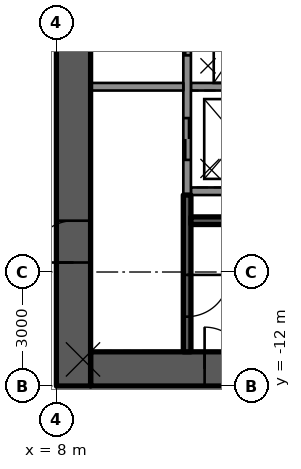
"""IFC4 building model, lengths in metres.
Left out: names, types, materials, properties, quantities, classifications, styles, units other than length and angle.
Written with IfcOpenShell. Run it as: python <this file> out.ifc"""

import sys

from ifc_helpers import new_model, si_unit, direction, frame, frame_2d, origin, place, context, subcontext, project, spatial, rectangle, extrude, element, fill, save


model = new_model("IFC4")
c1 = context("Model", 3, precision=1e-05, world=origin(), true_north=direction((0.0, 1.0)))
c2 = subcontext(c1, "Body", "Model", "MODEL_VIEW")
j1 = project(units=[si_unit("LENGTHUNIT", "METRE"), si_unit("PLANEANGLEUNIT", "RADIAN")], contexts=[c1])
p1 = place(None, origin())
s1 = spatial("IfcSite", under=j1, at=p1, CompositionType="ELEMENT")
p2 = place(p1, origin())
s2 = spatial("IfcBuilding", under=s1, at=p2, CompositionType="ELEMENT")
p3 = place(p2, frame((0.0, 0.0, 145.6)))
s3 = spatial("IfcBuildingStorey", under=s2, at=p3, CompositionType="ELEMENT", Elevation=145.6)
p4 = place(p3, frame((8.9, -11.55, 0.0), z_axis=(0.0, 0.0, 1.0), x_axis=(1.0, 0.0, 0.0)))
e1 = element("IfcWall", 1, at=p4, inside=s3, PredefinedType="SHEAR", context=c2, shape_type="SweptSolid", body=[
    extrude(rectangle(XDim=9.2, YDim=0.9, at=frame_2d((4.6, 0.0))), origin(), (0.0, 0.0, 1.0), 3.5),
])
p5 = place(p4, frame((3.0, 0.0, 0.0)))
e2 = element("IfcOpeningElement", 2, at=p5, cuts=e1, PredefinedType="OPENING", context=c2, shape_type="SweptSolid", body=[
    extrude(rectangle(XDim=1.1, YDim=2.1, at=frame_2d((0.55, 1.05))), frame((0.0, 0.46, 0.0), z_axis=(0.0, -1.0, 0.0), x_axis=(1.0, 0.0, 0.0)), (0.0, 0.0, 1.0), 0.92),
])
p6 = place(p3, frame((8.45, -12.0, 0.0), z_axis=(0.0, 0.0, 1.0), x_axis=(0.0, 1.0, 0.0)))
e3 = element("IfcWall", 3, at=p6, inside=s3, PredefinedType="SHEAR", context=c2, shape_type="SweptSolid", body=[
    extrude(rectangle(XDim=24.0, YDim=0.9, at=frame_2d((12.0, 0.0))), origin(), (0.0, 0.0, 1.0), 3.5),
])
p7 = place(p6, frame((12.6, 0.0, 0.0)))
e4 = element("IfcOpeningElement", 4, at=p7, cuts=e3, PredefinedType="OPENING", context=c2, shape_type="SweptSolid", body=[
    extrude(rectangle(XDim=1.8, YDim=2.1, at=frame_2d((0.9, 1.05))), frame((0.0, 0.46, 0.0), z_axis=(0.0, -1.0, 0.0), x_axis=(1.0, 0.0, 0.0)), (0.0, 0.0, 1.0), 0.92),
])
p8 = place(p6, frame((3.25, 0.0, 0.0)))
e5 = element("IfcOpeningElement", 5, at=p8, cuts=e3, PredefinedType="OPENING", context=c2, shape_type="SweptSolid", body=[
    extrude(rectangle(XDim=1.1, YDim=2.1, at=frame_2d((0.55, 1.05))), frame((0.0, 0.46, 0.0), z_axis=(0.0, -1.0, 0.0), x_axis=(1.0, 0.0, 0.0)), (0.0, 0.0, 1.0), 0.92),
])
p9 = place(p3, frame((11.54, -6.875, 0.0), z_axis=(0.0, 0.0, 1.0), x_axis=(1.0, 0.0, 0.0)))
e6 = element("IfcWall", 6, at=p9, inside=s3, PredefinedType="SOLIDWALL", context=c2, shape_type="SweptSolid", body=[
    extrude(rectangle(XDim=6.56, YDim=0.2, at=frame_2d((3.28, 0.0))), origin(), (0.0, 0.0, 1.0), 3.09),
])
p10 = place(p3, frame((11.54, -4.125, 0.0), z_axis=(0.0, 0.0, 1.0), x_axis=(1.0, 0.0, 0.0)))
e7 = element("IfcWall", 7, at=p10, inside=s3, PredefinedType="SOLIDWALL", context=c2, shape_type="SweptSolid", body=[
    extrude(rectangle(XDim=4.7, YDim=0.2, at=frame_2d((2.35, 0.0))), origin(), (0.0, 0.0, 1.0), 3.09),
])
p11 = place(p3, frame((11.44, 6.975, 0.0), z_axis=(0.0, 0.0, 1.0), x_axis=(0.0, -1.0, 0.0)))
e8 = element("IfcWall", 8, at=p11, inside=s3, PredefinedType="SOLIDWALL", context=c2, shape_type="SweptSolid", body=[
    extrude(rectangle(XDim=13.95, YDim=0.2, at=frame_2d((6.975, 0.0))), origin(), (0.0, 0.0, 1.0), 3.09),
])
p12 = place(p11, frame((9.175, 0.0, 0.0)))
e9 = element("IfcOpeningElement", 9, at=p12, cuts=e8, PredefinedType="OPENING", context=c2, shape_type="SweptSolid", body=[
    extrude(rectangle(XDim=1.1, YDim=2.1, at=frame_2d((0.55, 1.05))), frame((0.0, 0.11, 0.0), z_axis=(0.0, -1.0, 0.0), x_axis=(1.0, 0.0, 0.0)), (0.0, 0.0, 1.0), 0.22),
])
p13 = place(p11, frame((11.925, 0.0, 0.0)))
e10 = element("IfcOpeningElement", 10, at=p13, cuts=e8, PredefinedType="OPENING", context=c2, shape_type="SweptSolid", body=[
    extrude(rectangle(XDim=1.1, YDim=2.1, at=frame_2d((0.55, 1.05))), frame((0.0, 0.11, 0.0), z_axis=(0.0, -1.0, 0.0), x_axis=(1.0, 0.0, 0.0)), (0.0, 0.0, 1.0), 0.22),
])
p14 = place(p11, frame((1.075, 0.0, 0.0)))
e11 = element("IfcOpeningElement", 11, at=p14, cuts=e8, PredefinedType="OPENING", context=c2, shape_type="SweptSolid", body=[
    extrude(rectangle(XDim=0.8, YDim=2.1, at=frame_2d((0.4, 1.05))), frame((0.0, 0.11, 0.0), z_axis=(0.0, -1.0, 0.0), x_axis=(1.0, 0.0, 0.0)), (0.0, 0.0, 1.0), 0.22),
])
p15 = place(p3, frame((11.44, -6.975, 0.0), z_axis=(0.0, 0.0, 1.0), x_axis=(0.0, -1.0, 0.0)))
e12 = element("IfcWall", 12, at=p15, inside=s3, PredefinedType="SOLIDWALL", context=c2, shape_type="SweptSolid", body=[
    extrude(rectangle(XDim=4.125, YDim=0.2, at=frame_2d((2.062, 0.0))), origin(), (0.0, 0.0, 1.0), 3.09),
])
p16 = place(p15, frame((2.1, 0.0, 0.0)))
e13 = element("IfcOpeningElement", 13, at=p16, cuts=e12, PredefinedType="OPENING", context=c2, shape_type="SweptSolid", body=[
    extrude(rectangle(XDim=1.1, YDim=2.1, at=frame_2d((0.55, 1.05))), frame((0.0, 0.11, 0.0), z_axis=(0.0, -1.0, 0.0), x_axis=(1.0, 0.0, 0.0)), (0.0, 0.0, 1.0), 0.22),
])
p17 = place(p3, frame((11.54, -7.65, 0.0), z_axis=(0.0, 0.0, 1.0), x_axis=(1.0, 0.0, 0.0)))
e14 = element("IfcWall", 14, at=p17, inside=s3, PredefinedType="SOLIDWALL", context=c2, shape_type="SweptSolid", body=[
    extrude(rectangle(XDim=6.56, YDim=0.2, at=frame_2d((3.28, 0.0))), origin(), (0.0, 0.0, 1.0), 3.09),
])
p18 = place(p3, frame((8.9, -4.125, 0.0), z_axis=(0.0, 0.0, 1.0), x_axis=(1.0, 0.0, 0.0)))
e15 = element("IfcWall", 15, at=p18, inside=s3, PredefinedType="PARTITIONING", context=c2, shape_type="SweptSolid", body=[
    extrude(rectangle(XDim=2.44, YDim=0.2, at=frame_2d((1.22, 0.0))), origin(), (0.0, 0.0, 1.0), 3.09),
])
p19 = place(p12, origin())
e16 = element("IfcDoor", 16, at=p19, inside=s3, OperationType="DOUBLE_DOOR_SLIDING", PredefinedType="DOOR", context=c2, shape_type="SweptSolid", body=[
    extrude(rectangle(XDim=1.1, YDim=2.1, at=frame_2d((0.55, 1.05))), frame((0.0, 0.025, 0.0), z_axis=(0.0, -1.0, 0.0), x_axis=(1.0, 0.0, 0.0)), (0.0, 0.0, 1.0), 0.05),
])
fill(e9, e16)
p20 = place(p13, origin())
e17 = element("IfcDoor", 17, at=p20, inside=s3, OperationType="DOUBLE_DOOR_SLIDING", PredefinedType="DOOR", context=c2, shape_type="SweptSolid", body=[
    extrude(rectangle(XDim=1.1, YDim=2.1, at=frame_2d((0.55, 1.05))), frame((0.0, 0.025, 0.0), z_axis=(0.0, -1.0, 0.0), x_axis=(1.0, 0.0, 0.0)), (0.0, 0.0, 1.0), 0.05),
])
fill(e10, e17)
p21 = place(p8, origin())
e18 = element("IfcDoor", 18, at=p21, inside=s3, OperationType="SINGLE_SWING_LEFT", PredefinedType="DOOR", context=c2, shape_type="SweptSolid", body=[
    extrude(rectangle(XDim=1.1, YDim=2.1, at=frame_2d((0.55, 1.05))), frame((0.0, 0.025, 0.0), z_axis=(0.0, -1.0, 0.0), x_axis=(1.0, 0.0, 0.0)), (0.0, 0.0, 1.0), 0.05),
])
fill(e5, e18)
p22 = place(p5, origin())
e19 = element("IfcDoor", 19, at=p22, inside=s3, OperationType="SINGLE_SWING_LEFT", PredefinedType="DOOR", context=c2, shape_type="SweptSolid", body=[
    extrude(rectangle(XDim=1.1, YDim=2.1, at=frame_2d((0.55, 1.05))), frame((0.0, 0.025, 0.0), z_axis=(0.0, -1.0, 0.0), x_axis=(1.0, 0.0, 0.0)), (0.0, 0.0, 1.0), 0.05),
])
fill(e2, e19)
p23 = place(p16, origin())
e20 = element("IfcDoor", 20, at=p23, inside=s3, OperationType="SINGLE_SWING_RIGHT", PredefinedType="DOOR", context=c2, shape_type="SweptSolid", body=[
    extrude(rectangle(XDim=1.1, YDim=2.1, at=frame_2d((0.55, 1.05))), frame((0.0, 0.025, 0.0), z_axis=(0.0, -1.0, 0.0), x_axis=(1.0, 0.0, 0.0)), (0.0, 0.0, 1.0), 0.05),
])
fill(e13, e20)
save(model, sys.argv[1])
